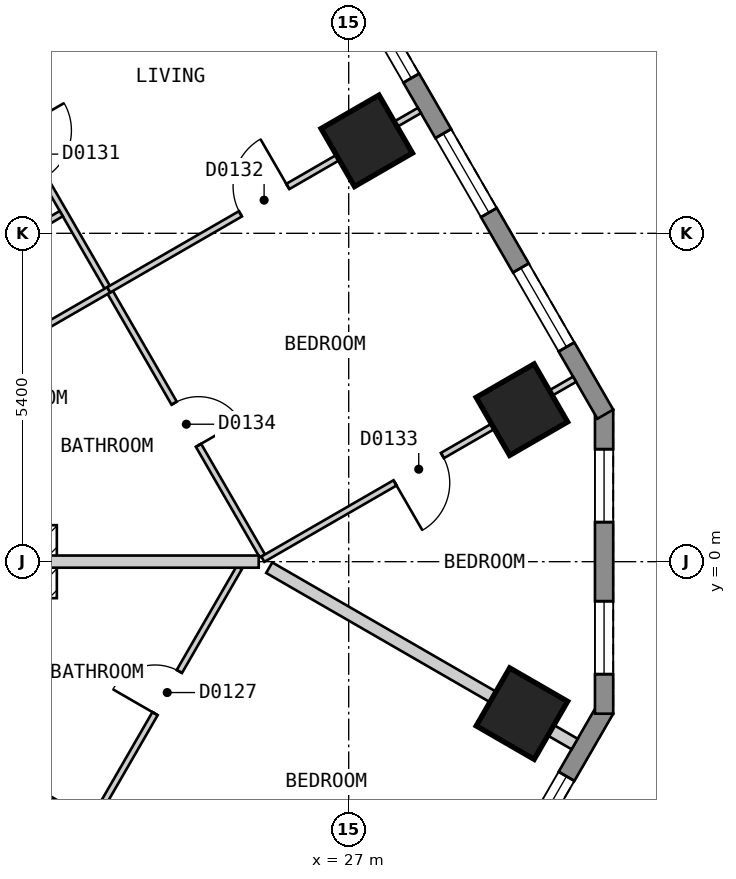
"""IFC4 building model, lengths in metres.
Left out: names, types, materials, properties, quantities, classifications, styles, units other than length and angle.
Written with IfcOpenShell. Run it as: python <this file> out.ifc"""

import sys

from ifc_helpers import new_model, si_unit, direction, frame, frame_2d, origin, origin_2d, place, context, subcontext, project, spatial, polyline, rectangle, outline, extrude, element, fill, save


model = new_model("IFC4")
c1 = context("Model", 3, precision=1e-05, world=origin(), true_north=direction((0.0, 1.0)))
c2 = subcontext(c1, "Body", "Model", "MODEL_VIEW")
j1 = project(units=[si_unit("LENGTHUNIT", "METRE"), si_unit("PLANEANGLEUNIT", "RADIAN")], contexts=[c1])
p1 = place(None, origin())
s1 = spatial("IfcSite", under=j1, at=p1, CompositionType="ELEMENT")
p2 = place(p1, origin())
s2 = spatial("IfcBuilding", under=s1, at=p2, CompositionType="ELEMENT")
p3 = place(p2, frame((0.0, 0.0, 23.4)))
s3 = spatial("IfcBuildingStorey", under=s2, at=p3, CompositionType="ELEMENT", Elevation=23.4)
for number, where, z_axis, x_axis in (
    (1, (29.849, -2.499, 0.0), (0.0, 0.0, 1.0), (0.5, 0.866, 0.0)),
    (2, (29.848, 2.5, 0.0), (0.0, 0.0, 1.0), (-0.5, 0.866, 0.0)),
    (3, (27.297, 6.921, 0.0), (0.0, 0.0, 1.0), (-0.5, 0.866, 0.0)),
):
    element("IfcColumn", number, at=place(p3, frame(where, z_axis=z_axis, x_axis=x_axis)), inside=s3, PredefinedType="COLUMN", context=c2, shape_type="SweptSolid", body=[
        extrude(rectangle(XDim=1.1, YDim=1.1, at=origin_2d()), origin(), (0.0, 0.0, 1.0), 3.0),
    ])
p4 = place(p3, frame((17.71, -25.825, 0.0), z_axis=(0.0, 0.0, 1.0), x_axis=(0.500001938803, 0.866024284413, 0.0)))
e4 = element("IfcWall", 4, at=p4, inside=s3, PredefinedType="SOLIDWALL", context=c2, shape_type="SweptSolid", body=[
    extrude(outline(polyline([(0.0, -0.15), (27.02, -0.15), (26.94, 0.15), (0.08, 0.15), (0.0, -0.15)])), origin(), (0.0, 0.0, 1.0), 2.7),
])
p5 = place(p4, frame((1.277, 0.0, 0.15)))
e5 = element("IfcOpeningElement", 5, at=p5, cuts=e4, PredefinedType="OPENING", context=c2, shape_type="SweptSolid", body=[
    extrude(rectangle(XDim=1.5, YDim=2.1, at=frame_2d((0.75, 1.05))), frame((0.0, 0.16, 0.0), z_axis=(0.0, -1.0, 0.0), x_axis=(1.0, 0.0, 0.0)), (0.0, 0.0, 1.0), 0.32),
])
p6 = place(p4, frame((3.829, 0.0, 0.15)))
e6 = element("IfcOpeningElement", 6, at=p6, cuts=e4, PredefinedType="OPENING", context=c2, shape_type="SweptSolid", body=[
    extrude(rectangle(XDim=1.5, YDim=2.1, at=frame_2d((0.75, 1.05))), frame((0.0, 0.16, 0.0), z_axis=(0.0, -1.0, 0.0), x_axis=(1.0, 0.0, 0.0)), (0.0, 0.0, 1.0), 0.32),
])
p7 = place(p4, frame((6.382, 0.0, 0.15)))
e7 = element("IfcOpeningElement", 7, at=p7, cuts=e4, PredefinedType="OPENING", context=c2, shape_type="SweptSolid", body=[
    extrude(rectangle(XDim=1.5, YDim=2.1, at=frame_2d((0.75, 1.05))), frame((0.0, 0.16, 0.0), z_axis=(0.0, -1.0, 0.0), x_axis=(1.0, 0.0, 0.0)), (0.0, 0.0, 1.0), 0.32),
])
p8 = place(p4, frame((8.933, 0.0, 0.15)))
e8 = element("IfcOpeningElement", 8, at=p8, cuts=e4, PredefinedType="OPENING", context=c2, shape_type="SweptSolid", body=[
    extrude(rectangle(XDim=1.5, YDim=2.1, at=frame_2d((0.75, 1.05))), frame((0.0, 0.16, 0.0), z_axis=(0.0, -1.0, 0.0), x_axis=(1.0, 0.0, 0.0)), (0.0, 0.0, 1.0), 0.32),
])
p9 = place(p4, frame((11.485, 0.0, 0.15)))
e9 = element("IfcOpeningElement", 9, at=p9, cuts=e4, PredefinedType="OPENING", context=c2, shape_type="SweptSolid", body=[
    extrude(rectangle(XDim=1.5, YDim=2.1, at=frame_2d((0.75, 1.05))), frame((0.0, 0.16, 0.0), z_axis=(0.0, -1.0, 0.0), x_axis=(1.0, 0.0, 0.0)), (0.0, 0.0, 1.0), 0.32),
])
p10 = place(p4, frame((14.037, 0.0, 0.15)))
e10 = element("IfcOpeningElement", 10, at=p10, cuts=e4, PredefinedType="OPENING", context=c2, shape_type="SweptSolid", body=[
    extrude(rectangle(XDim=1.5, YDim=2.1, at=frame_2d((0.75, 1.05))), frame((0.0, 0.16, 0.0), z_axis=(0.0, -1.0, 0.0), x_axis=(1.0, 0.0, 0.0)), (0.0, 0.0, 1.0), 0.32),
])
p11 = place(p4, frame((16.589, 0.0, 0.15)))
e11 = element("IfcOpeningElement", 11, at=p11, cuts=e4, PredefinedType="OPENING", context=c2, shape_type="SweptSolid", body=[
    extrude(rectangle(XDim=1.5, YDim=2.1, at=frame_2d((0.75, 1.05))), frame((0.0, 0.16, 0.0), z_axis=(0.0, -1.0, 0.0), x_axis=(1.0, 0.0, 0.0)), (0.0, 0.0, 1.0), 0.32),
])
p12 = place(p4, frame((19.141, 0.0, 0.15)))
e12 = element("IfcOpeningElement", 12, at=p12, cuts=e4, PredefinedType="OPENING", context=c2, shape_type="SweptSolid", body=[
    extrude(rectangle(XDim=1.5, YDim=2.1, at=frame_2d((0.75, 1.05))), frame((0.0, 0.16, 0.0), z_axis=(0.0, -1.0, 0.0), x_axis=(1.0, 0.0, 0.0)), (0.0, 0.0, 1.0), 0.32),
])
p13 = place(p4, frame((21.693, 0.0, 0.15)))
e13 = element("IfcOpeningElement", 13, at=p13, cuts=e4, PredefinedType="OPENING", context=c2, shape_type="SweptSolid", body=[
    extrude(rectangle(XDim=1.5, YDim=2.1, at=frame_2d((0.75, 1.05))), frame((0.0, 0.16, 0.0), z_axis=(0.0, -1.0, 0.0), x_axis=(1.0, 0.0, 0.0)), (0.0, 0.0, 1.0), 0.32),
])
p14 = place(p4, frame((24.244, 0.0, 0.15)))
e14 = element("IfcOpeningElement", 14, at=p14, cuts=e4, PredefinedType="OPENING", context=c2, shape_type="SweptSolid", body=[
    extrude(rectangle(XDim=1.5, YDim=2.1, at=frame_2d((0.75, 1.05))), frame((0.0, 0.16, 0.0), z_axis=(0.0, -1.0, 0.0), x_axis=(1.0, 0.0, 0.0)), (0.0, 0.0, 1.0), 0.32),
])
p15 = place(p3, frame((31.2, -2.5, 0.0), z_axis=(0.0, 0.0, 1.0), x_axis=(0.0, 1.0, 0.0)))
e15 = element("IfcWall", 15, at=p15, inside=s3, PredefinedType="SOLIDWALL", context=c2, shape_type="SweptSolid", body=[
    extrude(outline(polyline([(0.0, -0.15), (5.0, -0.15), (4.92, 0.15), (0.08, 0.15), (0.0, -0.15)])), origin(), (0.0, 0.0, 1.0), 2.7),
])
p16 = place(p15, frame((0.65, 0.0, 0.15)))
e16 = element("IfcOpeningElement", 16, at=p16, cuts=e15, PredefinedType="OPENING", context=c2, shape_type="SweptSolid", body=[
    extrude(rectangle(XDim=1.2, YDim=2.1, at=frame_2d((0.6, 1.05))), frame((0.0, 0.16, 0.0), z_axis=(0.0, -1.0, 0.0), x_axis=(1.0, 0.0, 0.0)), (0.0, 0.0, 1.0), 0.32),
])
p17 = place(p15, frame((3.15, 0.0, 0.15)))
e17 = element("IfcOpeningElement", 17, at=p17, cuts=e15, PredefinedType="OPENING", context=c2, shape_type="SweptSolid", body=[
    extrude(rectangle(XDim=1.2, YDim=2.1, at=frame_2d((0.6, 1.05))), frame((0.0, 0.16, 0.0), z_axis=(0.0, -1.0, 0.0), x_axis=(1.0, 0.0, 0.0)), (0.0, 0.0, 1.0), 0.32),
])
p18 = place(p3, frame((31.22, 2.425, 0.0), z_axis=(0.0, 0.0, 1.0), x_axis=(-0.500001938803, 0.866024284413, 0.0)))
e18 = element("IfcWall", 18, at=p18, inside=s3, PredefinedType="SOLIDWALL", context=c2, shape_type="SweptSolid", body=[
    extrude(outline(polyline([(0.0, -0.15), (27.02, -0.15), (26.94, 0.15), (0.08, 0.15), (0.0, -0.15)])), origin(), (0.0, 0.0, 1.0), 2.7),
])
p19 = place(p18, frame((1.277, 0.0, 0.15)))
e19 = element("IfcOpeningElement", 19, at=p19, cuts=e18, PredefinedType="OPENING", context=c2, shape_type="SweptSolid", body=[
    extrude(rectangle(XDim=1.5, YDim=2.1, at=frame_2d((0.75, 1.05))), frame((0.0, 0.16, 0.0), z_axis=(0.0, -1.0, 0.0), x_axis=(1.0, 0.0, 0.0)), (0.0, 0.0, 1.0), 0.32),
])
p20 = place(p18, frame((3.829, 0.0, 0.15)))
e20 = element("IfcOpeningElement", 20, at=p20, cuts=e18, PredefinedType="OPENING", context=c2, shape_type="SweptSolid", body=[
    extrude(rectangle(XDim=1.5, YDim=2.1, at=frame_2d((0.75, 1.05))), frame((0.0, 0.16, 0.0), z_axis=(0.0, -1.0, 0.0), x_axis=(1.0, 0.0, 0.0)), (0.0, 0.0, 1.0), 0.32),
])
p21 = place(p18, frame((6.382, 0.0, 0.15)))
e21 = element("IfcOpeningElement", 21, at=p21, cuts=e18, PredefinedType="OPENING", context=c2, shape_type="SweptSolid", body=[
    extrude(rectangle(XDim=1.5, YDim=2.1, at=frame_2d((0.75, 1.05))), frame((0.0, 0.16, 0.0), z_axis=(0.0, -1.0, 0.0), x_axis=(1.0, 0.0, 0.0)), (0.0, 0.0, 1.0), 0.32),
])
p22 = place(p18, frame((8.933, 0.0, 0.15)))
e22 = element("IfcOpeningElement", 22, at=p22, cuts=e18, PredefinedType="OPENING", context=c2, shape_type="SweptSolid", body=[
    extrude(rectangle(XDim=1.5, YDim=2.1, at=frame_2d((0.75, 1.05))), frame((0.0, 0.16, 0.0), z_axis=(0.0, -1.0, 0.0), x_axis=(1.0, 0.0, 0.0)), (0.0, 0.0, 1.0), 0.32),
])
p23 = place(p18, frame((11.485, 0.0, 0.15)))
e23 = element("IfcOpeningElement", 23, at=p23, cuts=e18, PredefinedType="OPENING", context=c2, shape_type="SweptSolid", body=[
    extrude(rectangle(XDim=1.5, YDim=2.1, at=frame_2d((0.75, 1.05))), frame((0.0, 0.16, 0.0), z_axis=(0.0, -1.0, 0.0), x_axis=(1.0, 0.0, 0.0)), (0.0, 0.0, 1.0), 0.32),
])
p24 = place(p18, frame((14.037, 0.0, 0.15)))
e24 = element("IfcOpeningElement", 24, at=p24, cuts=e18, PredefinedType="OPENING", context=c2, shape_type="SweptSolid", body=[
    extrude(rectangle(XDim=1.5, YDim=2.1, at=frame_2d((0.75, 1.05))), frame((0.0, 0.16, 0.0), z_axis=(0.0, -1.0, 0.0), x_axis=(1.0, 0.0, 0.0)), (0.0, 0.0, 1.0), 0.32),
])
p25 = place(p18, frame((16.589, 0.0, 0.15)))
e25 = element("IfcOpeningElement", 25, at=p25, cuts=e18, PredefinedType="OPENING", context=c2, shape_type="SweptSolid", body=[
    extrude(rectangle(XDim=1.5, YDim=2.1, at=frame_2d((0.75, 1.05))), frame((0.0, 0.16, 0.0), z_axis=(0.0, -1.0, 0.0), x_axis=(1.0, 0.0, 0.0)), (0.0, 0.0, 1.0), 0.32),
])
p26 = place(p18, frame((19.141, 0.0, 0.15)))
e26 = element("IfcOpeningElement", 26, at=p26, cuts=e18, PredefinedType="OPENING", context=c2, shape_type="SweptSolid", body=[
    extrude(rectangle(XDim=1.5, YDim=2.1, at=frame_2d((0.75, 1.05))), frame((0.0, 0.16, 0.0), z_axis=(0.0, -1.0, 0.0), x_axis=(1.0, 0.0, 0.0)), (0.0, 0.0, 1.0), 0.32),
])
p27 = place(p18, frame((21.693, 0.0, 0.15)))
e27 = element("IfcOpeningElement", 27, at=p27, cuts=e18, PredefinedType="OPENING", context=c2, shape_type="SweptSolid", body=[
    extrude(rectangle(XDim=1.5, YDim=2.1, at=frame_2d((0.75, 1.05))), frame((0.0, 0.16, 0.0), z_axis=(0.0, -1.0, 0.0), x_axis=(1.0, 0.0, 0.0)), (0.0, 0.0, 1.0), 0.32),
])
p28 = place(p18, frame((24.244, 0.0, 0.15)))
e28 = element("IfcOpeningElement", 28, at=p28, cuts=e18, PredefinedType="OPENING", context=c2, shape_type="SweptSolid", body=[
    extrude(rectangle(XDim=1.5, YDim=2.1, at=frame_2d((0.75, 1.05))), frame((0.0, 0.16, 0.0), z_axis=(0.0, -1.0, 0.0), x_axis=(1.0, 0.0, 0.0)), (0.0, 0.0, 1.0), 0.32),
])
p29 = place(p3, frame((20.551, 8.805, 0.0), z_axis=(0.0, 0.0, 1.0), x_axis=(0.499984387913, -0.86603441724, 0.0)))
e29 = element("IfcWall", 29, at=p29, inside=s3, PredefinedType="PARTITIONING", context=c2, shape_type="SweptSolid", body=[
    extrude(rectangle(XDim=10.058, YDim=0.1, at=frame_2d((5.029, 0.0))), origin(), (0.0, 0.0, 1.0), 2.7),
])
p30 = place(p29, frame((1.978, 0.0, 0.0)))
e30 = element("IfcOpeningElement", 30, at=p30, cuts=e29, PredefinedType="OPENING", context=c2, shape_type="SweptSolid", body=[
    extrude(rectangle(XDim=0.9, YDim=2.1, at=frame_2d((0.45, 1.05))), frame((0.0, 0.06, 0.0), z_axis=(0.0, -1.0, 0.0), x_axis=(1.0, 0.0, 0.0)), (0.0, 0.0, 1.0), 0.12),
])
p31 = place(p29, frame((7.157, 0.0, 0.0)))
e31 = element("IfcOpeningElement", 31, at=p31, cuts=e29, PredefinedType="OPENING", context=c2, shape_type="SweptSolid", body=[
    extrude(rectangle(XDim=0.8, YDim=2.1, at=frame_2d((0.4, 1.05))), frame((0.0, 0.06, 0.0), z_axis=(0.0, -1.0, 0.0), x_axis=(1.0, 0.0, 0.0)), (0.0, 0.0, 1.0), 0.12),
])
p32 = place(p3, frame((19.503, -2.419, 0.0), z_axis=(0.0, 0.0, 1.0), x_axis=(0.866047370643, -0.499961950354, 0.0)))
e32 = element("IfcWall", 32, at=p32, inside=s3, PredefinedType="PARTITIONING", context=c2, shape_type="SweptSolid", body=[
    extrude(rectangle(XDim=10.001, YDim=0.1, at=frame_2d((5.0, 0.0))), origin(), (0.0, 0.0, 1.0), 2.7),
])
p33 = place(p32, frame((4.912, 0.0, 0.0)))
e33 = element("IfcOpeningElement", 33, at=p33, cuts=e32, PredefinedType="OPENING", context=c2, shape_type="SweptSolid", body=[
    extrude(rectangle(XDim=0.9, YDim=2.1, at=frame_2d((0.45, 1.05))), frame((0.0, 0.06, 0.0), z_axis=(0.0, -1.0, 0.0), x_axis=(1.0, 0.0, 0.0)), (0.0, 0.0, 1.0), 0.12),
])
p34 = place(p3, frame((22.797, -4.263, 0.0), z_axis=(0.0, 0.0, 1.0), x_axis=(0.499820637322, 0.866128934112, 0.0)))
e34 = element("IfcWall", 34, at=p34, inside=s3, PredefinedType="PARTITIONING", context=c2, shape_type="SweptSolid", body=[
    extrude(rectangle(XDim=4.807, YDim=0.1, at=frame_2d((2.404, 0.0))), origin(), (0.0, 0.0, 1.0), 2.7),
])
p35 = place(p34, frame((2.037, 0.0, 0.0)))
e35 = element("IfcOpeningElement", 35, at=p35, cuts=e34, PredefinedType="OPENING", context=c2, shape_type="SweptSolid", body=[
    extrude(rectangle(XDim=0.8, YDim=2.1, at=frame_2d((0.4, 1.05))), frame((0.0, 0.06, 0.0), z_axis=(0.0, -1.0, 0.0), x_axis=(1.0, 0.0, 0.0)), (0.0, 0.0, 1.0), 0.12),
])
p36 = place(p3, frame((19.503, 2.421, 0.0), z_axis=(0.0, 0.0, 1.0), x_axis=(0.866083434238, 0.499899474834, 0.0)))
e36 = element("IfcWall", 36, at=p36, inside=s3, PredefinedType="PARTITIONING", context=c2, shape_type="SweptSolid", body=[
    extrude(rectangle(XDim=4.099, YDim=0.1, at=frame_2d((2.049, 0.0))), origin(), (0.0, 0.0, 1.0), 2.7),
])
p37 = place(p3, frame((25.588, 0.041, 0.0), z_axis=(0.0, 0.0, 1.0), x_axis=(0.866113484451, 0.499847408768, 0.0)))
e37 = element("IfcWall", 37, at=p37, inside=s3, PredefinedType="PARTITIONING", context=c2, shape_type="SweptSolid", body=[
    extrude(rectangle(XDim=5.92, YDim=0.1, at=frame_2d((2.96, 0.0))), origin(), (0.0, 0.0, 1.0), 2.7),
])
p38 = place(p37, frame((2.51, 0.0, 0.0)))
e38 = element("IfcOpeningElement", 38, at=p38, cuts=e37, PredefinedType="OPENING", context=c2, shape_type="SweptSolid", body=[
    extrude(rectangle(XDim=0.9, YDim=2.1, at=frame_2d((0.45, 1.05))), frame((0.0, 0.06, 0.0), z_axis=(0.0, -1.0, 0.0), x_axis=(1.0, 0.0, 0.0)), (0.0, 0.0, 1.0), 0.12),
])
p39 = place(p3, frame((18.788, 3.658, 0.0), z_axis=(0.0, 0.0, 1.0), x_axis=(0.860114269096, 0.510101405701, 0.0)))
e39 = element("IfcWall", 39, at=p39, inside=s3, PredefinedType="PARTITIONING", context=c2, shape_type="SweptSolid", body=[
    extrude(rectangle(XDim=4.051, YDim=0.1, at=frame_2d((2.025, 0.0))), origin(), (0.0, 0.0, 1.0), 2.7),
])
p40 = place(p39, frame((1.6, 0.0, 0.0)))
e40 = element("IfcOpeningElement", 40, at=p40, cuts=e39, PredefinedType="OPENING", context=c2, shape_type="SweptSolid", body=[
    extrude(rectangle(XDim=0.8, YDim=2.1, at=frame_2d((0.4, 1.05))), frame((0.0, 0.06, 0.0), z_axis=(0.0, -1.0, 0.0), x_axis=(1.0, 0.0, 0.0)), (0.0, 0.0, 1.0), 0.12),
])
p41 = place(p3, frame((25.693, -0.099, 0.0), z_axis=(0.0, 0.0, 1.0), x_axis=(0.866032775405, -0.499987231761, 0.0)))
e41 = element("IfcWall", 41, at=p41, inside=s3, PredefinedType="PARTITIONING", context=c2, shape_type="SweptSolid", body=[
    extrude(rectangle(XDim=5.8, YDim=0.2, at=frame_2d((2.9, 0.0))), origin(), (0.0, 0.0, 1.0), 2.7),
])
p42 = place(p3, frame((20.784, 0.001, 0.0), z_axis=(0.0, 0.0, 1.0), x_axis=(1.0, 0.0, 0.0)))
e42 = element("IfcWall", 42, at=p42, inside=s3, PredefinedType="PARTITIONING", context=c2, shape_type="SweptSolid", body=[
    extrude(rectangle(XDim=4.736, YDim=0.2, at=frame_2d((2.368, 0.0))), origin(), (0.0, 0.0, 1.0), 2.7),
])
p43 = place(p3, frame((16.95, 6.841, 0.0), z_axis=(0.0, 0.0, 1.0), x_axis=(0.866022959057, 0.500004234368, 0.0)))
e43 = element("IfcWall", 43, at=p43, inside=s3, PredefinedType="PARTITIONING", context=c2, shape_type="SweptSolid", body=[
    extrude(rectangle(XDim=10.0, YDim=0.2, at=frame_2d((5.0, 0.0))), origin(), (0.0, 0.0, 1.0), 2.7),
])
p44 = place(p3, frame((23.053, 4.47, 0.0), z_axis=(0.0, 0.0, 1.0), x_axis=(0.866052608538, 0.499952877023, 0.0)))
e44 = element("IfcWall", 44, at=p44, inside=s3, PredefinedType="PARTITIONING", context=c2, shape_type="SweptSolid", body=[
    extrude(rectangle(XDim=5.9, YDim=0.1, at=frame_2d((2.95, 0.0))), origin(), (0.0, 0.0, 1.0), 2.7),
])
p45 = place(p44, frame((2.501, 0.0, 0.0)))
e45 = element("IfcOpeningElement", 45, at=p45, cuts=e44, PredefinedType="OPENING", context=c2, shape_type="SweptSolid", body=[
    extrude(rectangle(XDim=0.9, YDim=2.1, at=frame_2d((0.45, 1.05))), frame((0.0, 0.06, 0.0), z_axis=(0.0, -1.0, 0.0), x_axis=(1.0, 0.0, 0.0)), (0.0, 0.0, 1.0), 0.12),
])
p46 = place(p14, origin())
e46 = element("IfcWindow", 46, at=p46, inside=s3, PartitioningType="SINGLE_PANEL", PredefinedType="WINDOW", context=c2, shape_type="SweptSolid", body=[
    extrude(rectangle(XDim=1.5, YDim=2.1, at=frame_2d((0.75, 1.05))), frame((0.0, 0.03, 0.0), z_axis=(0.0, -1.0, 0.0), x_axis=(1.0, 0.0, 0.0)), (0.0, 0.0, 1.0), 0.06),
])
fill(e14, e46)
p47 = place(p16, origin())
e47 = element("IfcWindow", 47, at=p47, inside=s3, PartitioningType="SINGLE_PANEL", PredefinedType="WINDOW", context=c2, shape_type="SweptSolid", body=[
    extrude(rectangle(XDim=1.2, YDim=2.1, at=frame_2d((0.6, 1.05))), frame((0.0, 0.03, 0.0), z_axis=(0.0, -1.0, 0.0), x_axis=(1.0, 0.0, 0.0)), (0.0, 0.0, 1.0), 0.06),
])
fill(e16, e47)
p48 = place(p17, origin())
e48 = element("IfcWindow", 48, at=p48, inside=s3, PartitioningType="SINGLE_PANEL", PredefinedType="WINDOW", context=c2, shape_type="SweptSolid", body=[
    extrude(rectangle(XDim=1.2, YDim=2.1, at=frame_2d((0.6, 1.05))), frame((0.0, 0.03, 0.0), z_axis=(0.0, -1.0, 0.0), x_axis=(1.0, 0.0, 0.0)), (0.0, 0.0, 1.0), 0.06),
])
fill(e17, e48)
p49 = place(p19, origin())
e49 = element("IfcWindow", 49, at=p49, inside=s3, PartitioningType="SINGLE_PANEL", PredefinedType="WINDOW", context=c2, shape_type="SweptSolid", body=[
    extrude(rectangle(XDim=1.5, YDim=2.1, at=frame_2d((0.75, 1.05))), frame((0.0, 0.03, 0.0), z_axis=(0.0, -1.0, 0.0), x_axis=(1.0, 0.0, 0.0)), (0.0, 0.0, 1.0), 0.06),
])
fill(e19, e49)
p50 = place(p20, origin())
e50 = element("IfcWindow", 50, at=p50, inside=s3, PartitioningType="SINGLE_PANEL", PredefinedType="WINDOW", context=c2, shape_type="SweptSolid", body=[
    extrude(rectangle(XDim=1.5, YDim=2.1, at=frame_2d((0.75, 1.05))), frame((0.0, 0.03, 0.0), z_axis=(0.0, -1.0, 0.0), x_axis=(1.0, 0.0, 0.0)), (0.0, 0.0, 1.0), 0.06),
])
fill(e20, e50)
p51 = place(p21, origin())
e51 = element("IfcWindow", 51, at=p51, inside=s3, PartitioningType="SINGLE_PANEL", PredefinedType="WINDOW", context=c2, shape_type="SweptSolid", body=[
    extrude(rectangle(XDim=1.5, YDim=2.1, at=frame_2d((0.75, 1.05))), frame((0.0, 0.03, 0.0), z_axis=(0.0, -1.0, 0.0), x_axis=(1.0, 0.0, 0.0)), (0.0, 0.0, 1.0), 0.06),
])
fill(e21, e51)
p52 = place(p35, origin())
e52 = element("IfcDoor", 52, at=p52, inside=s3, OperationType="SINGLE_SWING_LEFT", PredefinedType="DOOR", context=c2, shape_type="SweptSolid", body=[
    extrude(rectangle(XDim=0.8, YDim=2.1, at=frame_2d((0.4, 1.05))), frame((0.0, 0.025, 0.0), z_axis=(0.0, -1.0, 0.0), x_axis=(1.0, 0.0, 0.0)), (0.0, 0.0, 1.0), 0.05),
])
fill(e35, e52)
p53 = place(p45, origin())
e53 = element("IfcDoor", 53, at=p53, inside=s3, OperationType="SINGLE_SWING_RIGHT", PredefinedType="DOOR", context=c2, shape_type="SweptSolid", body=[
    extrude(rectangle(XDim=0.9, YDim=2.1, at=frame_2d((0.45, 1.05))), frame((0.0, 0.025, 0.0), z_axis=(0.0, -1.0, 0.0), x_axis=(1.0, 0.0, 0.0)), (0.0, 0.0, 1.0), 0.05),
])
fill(e45, e53)
p54 = place(p38, origin())
e54 = element("IfcDoor", 54, at=p54, inside=s3, OperationType="SINGLE_SWING_LEFT", PredefinedType="DOOR", context=c2, shape_type="SweptSolid", body=[
    extrude(rectangle(XDim=0.9, YDim=2.1, at=frame_2d((0.45, 1.05))), frame((0.0, 0.025, 0.0), z_axis=(0.0, -1.0, 0.0), x_axis=(1.0, 0.0, 0.0)), (0.0, 0.0, 1.0), 0.05),
])
fill(e38, e54)
p55 = place(p31, origin())
e55 = element("IfcDoor", 55, at=p55, inside=s3, OperationType="SINGLE_SWING_RIGHT", PredefinedType="DOOR", context=c2, shape_type="SweptSolid", body=[
    extrude(rectangle(XDim=0.8, YDim=2.1, at=frame_2d((0.4, 1.05))), frame((0.0, 0.025, 0.0), z_axis=(0.0, -1.0, 0.0), x_axis=(1.0, 0.0, 0.0)), (0.0, 0.0, 1.0), 0.05),
])
fill(e31, e55)
save(model, sys.argv[1])
